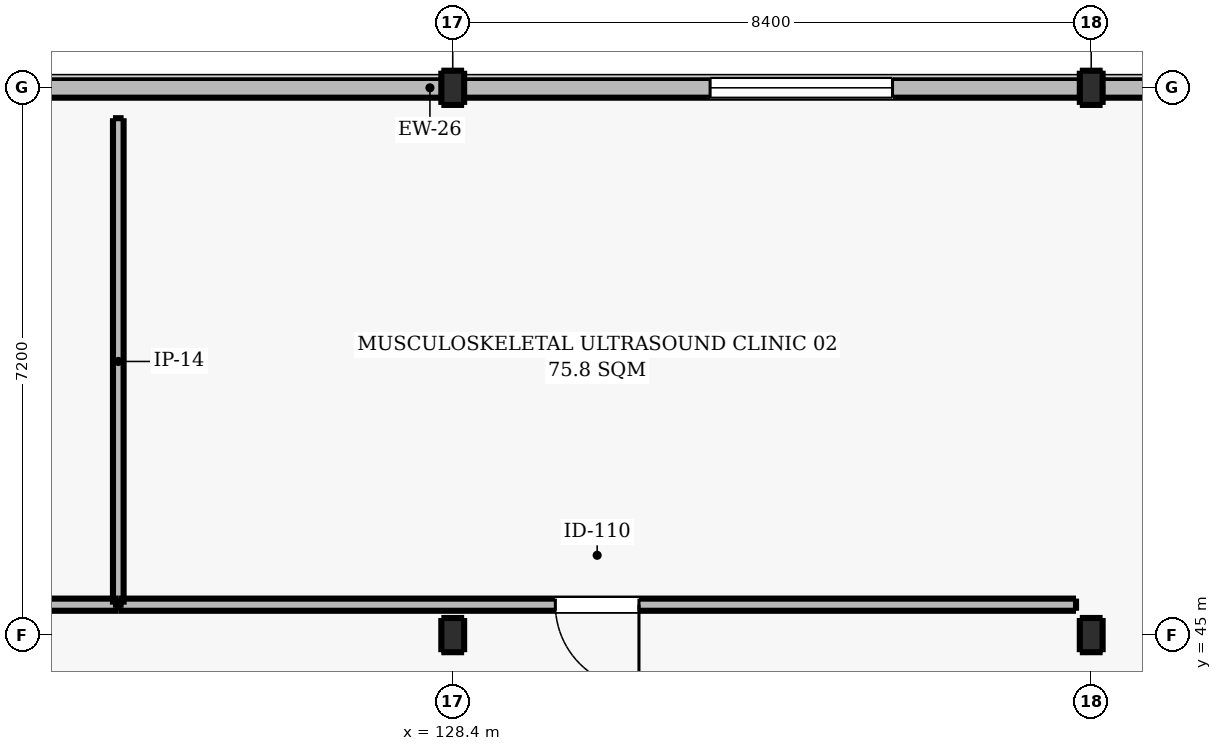
"""IFC4 building model, lengths in metres.
Left out: names, types, materials, properties, quantities, classifications, styles, units other than length and angle.
Written with IfcOpenShell. Run it as: python <this file> out.ifc"""

import sys

from ifc_helpers import new_model, si_unit, direction, frame, frame_2d, origin, origin_2d, place, context, subcontext, project, spatial, rectangle, i_section, extrude, element, fill, save


model = new_model("IFC4")
c1 = context("Model", 3, precision=1e-05, world=origin(), true_north=direction((0.0, 1.0)))
c2 = subcontext(c1, "Body", "Model", "MODEL_VIEW")
j1 = project(units=[si_unit("LENGTHUNIT", "METRE"), si_unit("PLANEANGLEUNIT", "RADIAN")], contexts=[c1])
p1 = place(None, origin())
s1 = spatial("IfcSite", under=j1, at=p1, CompositionType="ELEMENT")
p2 = place(p1, origin())
s2 = spatial("IfcBuilding", under=s1, at=p2, CompositionType="ELEMENT")
p3 = place(p2, frame((0.0, 0.0, 5.1)))
s3 = spatial("IfcBuildingStorey", under=s2, at=p3, CompositionType="ELEMENT", Elevation=5.1)
for number, where, z_axis, x_axis in (
    (1, (128.4, 45.0, 0.0), (0.0, 0.0, 1.0), (1.0, 0.0, 0.0)),
    (2, (128.4, 52.2, 0.0), (0.0, 0.0, 1.0), (1.0, 0.0, 0.0)),
    (3, (136.8, 45.0, 0.0), (0.0, 0.0, 1.0), (1.0, 0.0, 0.0)),
    (4, (136.8, 52.2, 0.0), (0.0, 0.0, 1.0), (1.0, 0.0, 0.0)),
):
    element("IfcColumn", number, at=place(p3, frame(where, z_axis=z_axis, x_axis=x_axis)), inside=s3, PredefinedType="COLUMN", context=c2, shape_type="SweptSolid", body=[
        extrude(i_section(OverallWidth=0.3, OverallDepth=0.45, WebThickness=0.014, FlangeThickness=0.026, FilletRadius=0.027, at=origin_2d()), origin(), (0.0, 0.0, 1.0), 4.5),
    ])
p4 = place(p3, frame((111.0, 52.2, 0.0), z_axis=(0.0, 0.0, 1.0), x_axis=(1.0, 0.0, 0.0)))
e5 = element("IfcWall", 5, at=p4, inside=s3, PredefinedType="SOLIDWALL", context=c2, shape_type="SweptSolid", body=[
    extrude(rectangle(XDim=34.2, YDim=0.26, at=frame_2d((17.1, 0.0))), origin(), (0.0, 0.0, 1.0), 3.68),
])
p5 = place(p4, frame((1.243, 0.0, 0.95)))
e6 = element("IfcOpeningElement", 6, at=p5, cuts=e5, PredefinedType="OPENING", context=c2, shape_type="SweptSolid", body=[
    extrude(rectangle(XDim=2.4, YDim=1.75, at=frame_2d((1.2, 0.875))), frame((0.0, 0.14, 0.0), z_axis=(0.0, -1.0, 0.0), x_axis=(1.0, 0.0, 0.0)), (0.0, 0.0, 1.0), 0.28),
])
p6 = place(p4, frame((20.786, 0.0, 0.95)))
e7 = element("IfcOpeningElement", 7, at=p6, cuts=e5, PredefinedType="OPENING", context=c2, shape_type="SweptSolid", body=[
    extrude(rectangle(XDim=2.4, YDim=1.75, at=frame_2d((1.2, 0.875))), frame((0.0, 0.14, 0.0), z_axis=(0.0, -1.0, 0.0), x_axis=(1.0, 0.0, 0.0)), (0.0, 0.0, 1.0), 0.28),
])
p7 = place(p4, frame((30.557, 0.0, 0.95)))
e8 = element("IfcOpeningElement", 8, at=p7, cuts=e5, PredefinedType="OPENING", context=c2, shape_type="SweptSolid", body=[
    extrude(rectangle(XDim=2.4, YDim=1.75, at=frame_2d((1.2, 0.875))), frame((0.0, 0.14, 0.0), z_axis=(0.0, -1.0, 0.0), x_axis=(1.0, 0.0, 0.0)), (0.0, 0.0, 1.0), 0.28),
])
p8 = place(p3, frame((111.4, 45.4, 0.0), z_axis=(0.0, 0.0, 1.0), x_axis=(1.0, 0.0, 0.0)))
e9 = element("IfcWall", 9, at=p8, inside=s3, PredefinedType="PARTITIONING", context=c2, shape_type="SweptSolid", body=[
    extrude(rectangle(XDim=12.6, YDim=0.16, at=frame_2d((6.3, 0.0))), origin(), (0.0, 0.0, 1.0), 4.21),
])
p9 = place(p8, frame((5.75, 0.0, 0.0)))
e10 = element("IfcOpeningElement", 10, at=p9, cuts=e9, PredefinedType="OPENING", context=c2, shape_type="SweptSolid", body=[
    extrude(rectangle(XDim=1.1, YDim=2.15, at=frame_2d((0.55, 1.075))), frame((0.0, 0.09, 0.0), z_axis=(0.0, -1.0, 0.0), x_axis=(1.0, 0.0, 0.0)), (0.0, 0.0, 1.0), 0.18),
])
p10 = place(p3, frame((124.0, 45.4, 0.0), z_axis=(0.0, 0.0, 1.0), x_axis=(0.0, 1.0, 0.0)))
e11 = element("IfcWall", 11, at=p10, inside=s3, PredefinedType="PARTITIONING", context=c2, shape_type="SweptSolid", body=[
    extrude(rectangle(XDim=6.4, YDim=0.14, at=frame_2d((3.2, 0.0))), origin(), (0.0, 0.0, 1.0), 4.21),
])
p11 = place(p3, frame((124.0, 45.4, 0.0), z_axis=(0.0, 0.0, 1.0), x_axis=(1.0, 0.0, 0.0)))
e12 = element("IfcWall", 12, at=p11, inside=s3, PredefinedType="PARTITIONING", context=c2, shape_type="SweptSolid", body=[
    extrude(rectangle(XDim=12.6, YDim=0.16, at=frame_2d((6.3, 0.0))), origin(), (0.0, 0.0, 1.0), 4.21),
])
p12 = place(p11, frame((5.75, 0.0, 0.0)))
e13 = element("IfcOpeningElement", 13, at=p12, cuts=e12, PredefinedType="OPENING", context=c2, shape_type="SweptSolid", body=[
    extrude(rectangle(XDim=1.1, YDim=2.15, at=frame_2d((0.55, 1.075))), frame((0.0, 0.09, 0.0), z_axis=(0.0, -1.0, 0.0), x_axis=(1.0, 0.0, 0.0)), (0.0, 0.0, 1.0), 0.18),
])
p13 = place(p6, origin())
e14 = element("IfcWindow", 14, at=p13, inside=s3, PartitioningType="SINGLE_PANEL", PredefinedType="WINDOW", context=c2, shape_type="SweptSolid", body=[
    extrude(rectangle(XDim=2.4, YDim=1.75, at=frame_2d((1.2, 0.875))), frame((0.0, 0.03, 0.0), z_axis=(0.0, -1.0, 0.0), x_axis=(1.0, 0.0, 0.0)), (0.0, 0.0, 1.0), 0.06),
])
fill(e7, e14)
p14 = place(p12, frame((1.1, 0.0, 0.0), z_axis=(0.0, 0.0, 1.0), x_axis=(-1.0, 0.0, 0.0)))
e15 = element("IfcDoor", 15, at=p14, inside=s3, OperationType="SINGLE_SWING_RIGHT", PredefinedType="DOOR", context=c2, shape_type="SweptSolid", body=[
    extrude(rectangle(XDim=1.1, YDim=2.15, at=frame_2d((0.55, 1.075))), frame((0.0, 0.025, 0.0), z_axis=(0.0, -1.0, 0.0), x_axis=(1.0, 0.0, 0.0)), (0.0, 0.0, 1.0), 0.05),
])
fill(e13, e15)
save(model, sys.argv[1])
